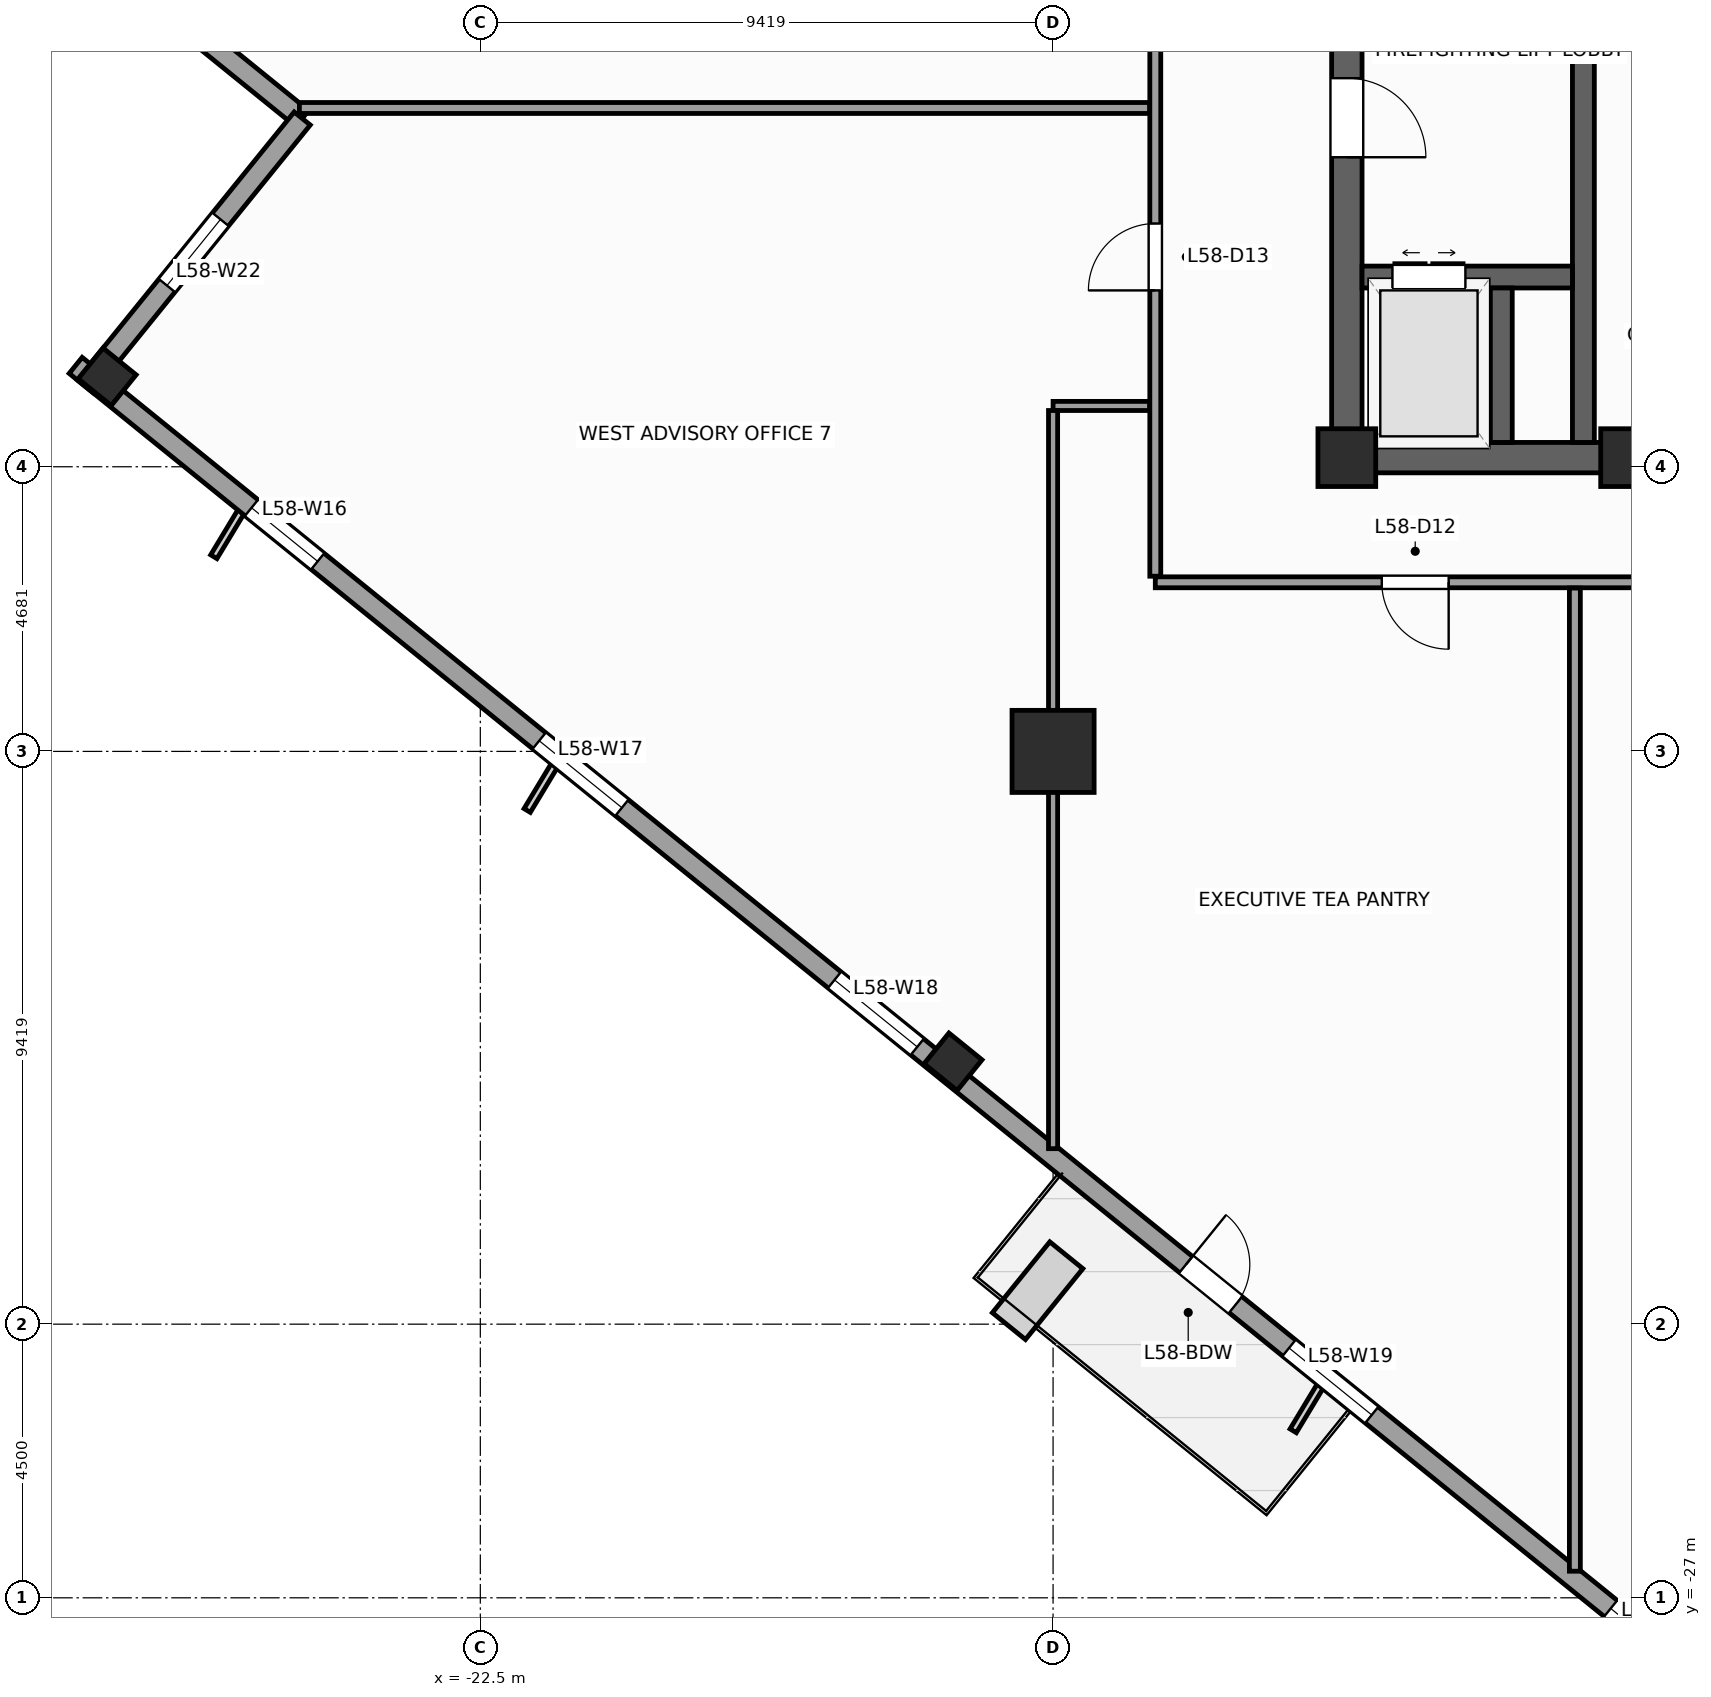
"""IFC4 building model, lengths in metres.
Left out: names, types, materials, properties, quantities, classifications, styles, units other than length and angle.
Written with IfcOpenShell. Run it as: python <this file> out.ifc"""

import sys

from ifc_helpers import new_model, si_unit, direction, frame, frame_2d, origin, origin_2d, place, context, subcontext, project, spatial, rectangle, extrude, source, transform, mapped, element, fill, save


model = new_model("IFC4")
c1 = context("Model", 3, precision=1e-05, world=origin(), true_north=direction((0.0, 1.0)))
c2 = subcontext(c1, "Body", "Model", "MODEL_VIEW")
j1 = project(units=[si_unit("LENGTHUNIT", "METRE"), si_unit("PLANEANGLEUNIT", "RADIAN")], contexts=[c1])
p1 = place(None, origin())
s1 = spatial("IfcSite", under=j1, at=p1, CompositionType="ELEMENT")
p2 = place(p1, origin())
s2 = spatial("IfcBuilding", under=s1, at=p2, CompositionType="ELEMENT")
p3 = place(p2, frame((0.0, 0.0, 240.7)))
s3 = spatial("IfcBuildingStorey", under=s2, at=p3, CompositionType="ELEMENT", Elevation=240.7)
p4 = place(p3, frame((-8.5, -8.25, 0.0), z_axis=(0.0, 0.0, 1.0), x_axis=(1.0, 0.0, 0.0)))
e1 = element("IfcWall", 1, at=p4, inside=s3, PredefinedType="SHEAR", context=c2, shape_type="SweptSolid", body=[
    extrude(rectangle(XDim=17.0, YDim=0.5, at=frame_2d((8.5, 0.0))), origin(), (0.0, 0.0, 1.0), 3.9),
])
p5 = place(p4, frame((7.85, 0.0, 0.0)))
e2 = element("IfcOpeningElement", 2, at=p5, cuts=e1, PredefinedType="OPENING", context=c2, shape_type="SweptSolid", body=[
    extrude(rectangle(XDim=1.3, YDim=2.2, at=frame_2d((0.65, 1.1))), frame((0.0, 0.26, 0.0), z_axis=(0.0, -1.0, 0.0), x_axis=(1.0, 0.0, 0.0)), (0.0, 0.0, 1.0), 0.52),
])
p6 = place(p3, frame((-8.25, -8.0, 0.0), z_axis=(0.0, 0.0, 1.0), x_axis=(0.0, 1.0, 0.0)))
e3 = element("IfcWall", 3, at=p6, inside=s3, PredefinedType="SHEAR", context=c2, shape_type="SweptSolid", body=[
    extrude(rectangle(XDim=16.0, YDim=0.5, at=frame_2d((8.0, 0.0))), origin(), (0.0, 0.0, 1.0), 3.9),
])
p7 = place(p6, frame((4.69, 0.0, 0.0)))
e4 = element("IfcOpeningElement", 4, at=p7, cuts=e3, PredefinedType="OPENING", context=c2, shape_type="SweptSolid", body=[
    extrude(rectangle(XDim=1.3, YDim=2.2, at=frame_2d((0.65, 1.1))), frame((0.0, 0.26, 0.0), z_axis=(0.0, -1.0, 0.0), x_axis=(1.0, 0.0, 0.0)), (0.0, 0.0, 1.0), 0.52),
])
p8 = place(p3, frame((-4.36, -8.0, 0.0), z_axis=(0.0, 0.0, 1.0), x_axis=(0.0, 1.0, 0.0)))
e5 = element("IfcWall", 5, at=p8, inside=s3, PredefinedType="SHEAR", context=c2, shape_type="SweptSolid", body=[
    extrude(rectangle(XDim=16.0, YDim=0.36, at=frame_2d((8.0, 0.0))), origin(), (0.0, 0.0, 1.0), 3.9),
])
p9 = place(p3, frame((-8.0, -5.28, 0.0), z_axis=(0.0, 0.0, 1.0), x_axis=(1.0, 0.0, 0.0)))
e6 = element("IfcWall", 6, at=p9, inside=s3, PredefinedType="SHEAR", context=c2, shape_type="SweptSolid", body=[
    extrude(rectangle(XDim=3.46, YDim=0.36, at=frame_2d((1.73, 0.0))), origin(), (0.0, 0.0, 1.0), 3.9),
])
p10 = place(p9, frame((0.5, 0.0, 0.0)))
e7 = element("IfcOpeningElement", 7, at=p10, cuts=e6, PredefinedType="OPENING", context=c2, shape_type="SweptSolid", body=[
    extrude(rectangle(XDim=1.2, YDim=2.25, at=frame_2d((0.6, 1.125))), frame((0.0, 0.19, 0.0), z_axis=(0.0, -1.0, 0.0), x_axis=(1.0, 0.0, 0.0)), (0.0, 0.0, 1.0), 0.38),
])
p11 = place(p3, frame((-5.71, -8.0, 0.0), z_axis=(0.0, 0.0, 1.0), x_axis=(0.0, 1.0, 0.0)))
e8 = element("IfcWall", 8, at=p11, inside=s3, PredefinedType="SHEAR", context=c2, shape_type="SweptSolid", body=[
    extrude(rectangle(XDim=2.54, YDim=0.36, at=frame_2d((1.27, 0.0))), origin(), (0.0, 0.0, 1.0), 3.9),
])
m1 = source(origin(), c2, "Body", "SweptSolid", [
    extrude(rectangle(XDim=0.95, YDim=0.95, at=origin_2d()), origin(), (0.0, 0.0, 1.0), 3.9),
])
for number, where, z_axis, x_axis in (
    (9, (-8.25, -8.25, 0.0), (0.0, 0.0, 1.0), (1.0, 0.0, 0.0)),
    (10, (-3.6, -8.25, 0.0), (0.0, 0.0, 1.0), (1.0, 0.0, 0.0)),
):
    element("IfcColumn", number, at=place(p3, frame(where, z_axis=z_axis, x_axis=x_axis)), inside=s3, PredefinedType="PILASTER", context=c2, shape_type="MappedRepresentation", body=[
        mapped(m1, transform((0.0, 0.0, 0.0), scale=1.0)),
    ])
m2 = source(origin(), c2, "Body", "SweptSolid", [
    extrude(rectangle(XDim=1.35, YDim=1.35, at=origin_2d()), origin(), (0.0, 0.0, 1.0), 3.9),
])
p12 = place(p3, frame((-13.081, -13.081, 0.0), z_axis=(0.0, 0.0, 1.0), x_axis=(1.0, 0.0, 0.0)))
e11 = element("IfcColumn", 11, at=p12, inside=s3, PredefinedType="COLUMN", context=c2, shape_type="MappedRepresentation", body=[
    mapped(m2, transform((0.0, 0.0, 0.0), scale=1.0)),
])
m3 = source(origin(), c2, "Body", "SweptSolid", [
    extrude(rectangle(XDim=0.65, YDim=0.7, at=origin_2d()), origin(), (0.0, 0.0, 1.0), 3.9),
])
for number, where, z_axis, x_axis in (
    (12, (-28.637, -6.92, 0.0), (0.0, 0.0, 1.0), (0.629, 0.777, 0.0)),
    (13, (-14.726, -18.185, 0.0), (0.0, 0.0, 1.0), (0.629, 0.777, 0.0)),
):
    element("IfcColumn", number, at=place(p3, frame(where, z_axis=z_axis, x_axis=x_axis)), inside=s3, PredefinedType="COLUMN", context=c2, shape_type="MappedRepresentation", body=[
        mapped(m3, transform((0.0, 0.0, 0.0), scale=1.0)),
    ])
p13 = place(p3, frame((-29.703, 0.789, 0.0), z_axis=(0.0, 0.0, 1.0), x_axis=(0.77714355312, -0.629323365087, 0.0)))
e14 = element("IfcWall", 14, at=p13, inside=s3, PredefinedType="STANDARD", context=c2, shape_type="SweptSolid", body=[
    extrude(rectangle(XDim=5.5, YDim=0.34, at=frame_2d((2.75, 0.0))), origin(), (0.0, 0.0, 1.0), 3.66),
])
p14 = place(p3, frame((-25.429, -2.673, 0.0), z_axis=(0.0, 0.0, 1.0), x_axis=(-0.629299794138, -0.777162640055, 0.0)))
e15 = element("IfcWall", 15, at=p14, inside=s3, PredefinedType="STANDARD", context=c2, shape_type="SweptSolid", body=[
    extrude(rectangle(XDim=5.67, YDim=0.34, at=frame_2d((2.835, 0.0))), origin(), (0.0, 0.0, 1.0), 3.66),
])
p15 = place(p14, frame((2.135, 0.0, 0.48)))
e16 = element("IfcOpeningElement", 16, at=p15, cuts=e15, PredefinedType="OPENING", context=c2, shape_type="SweptSolid", body=[
    extrude(rectangle(XDim=1.4, YDim=2.4, at=frame_2d((0.7, 1.2))), frame((0.0, 0.18, 0.0), z_axis=(0.0, -1.0, 0.0), x_axis=(1.0, 0.0, 0.0)), (0.0, 0.0, 1.0), 0.36),
])
p16 = place(p3, frame((-29.154, -6.733, 0.0), z_axis=(0.0, 0.0, 1.0), x_axis=(0.77714192302, -0.629325378072, 0.0)))
e17 = element("IfcWall", 17, at=p16, inside=s3, PredefinedType="STANDARD", context=c2, shape_type="SweptSolid", body=[
    extrude(rectangle(XDim=36.84, YDim=0.34, at=frame_2d((18.42, 0.0))), origin(), (0.0, 0.0, 1.0), 2.96),
])
p17 = place(p16, frame((23.495, 0.0, 0.0)))
e18 = element("IfcOpeningElement", 18, at=p17, cuts=e17, PredefinedType="OPENING", context=c2, shape_type="SweptSolid", body=[
    extrude(rectangle(XDim=1.05, YDim=2.25, at=frame_2d((0.525, 1.125))), frame((0.0, 0.18, 0.0), z_axis=(0.0, -1.0, 0.0), x_axis=(1.0, 0.0, 0.0)), (0.0, 0.0, 1.0), 0.36),
])
p18 = place(p16, frame((3.721, 0.0, 0.48)))
e19 = element("IfcOpeningElement", 19, at=p18, cuts=e17, PredefinedType="OPENING", context=c2, shape_type="SweptSolid", body=[
    extrude(rectangle(XDim=1.4, YDim=2.4, at=frame_2d((0.7, 1.2))), frame((0.0, 0.18, 0.0), z_axis=(0.0, -1.0, 0.0), x_axis=(1.0, 0.0, 0.0)), (0.0, 0.0, 1.0), 0.36),
])
p19 = place(p16, frame((9.809, 0.0, 0.58)))
e20 = element("IfcOpeningElement", 20, at=p19, cuts=e17, PredefinedType="OPENING", context=c2, shape_type="SweptSolid", body=[
    extrude(rectangle(XDim=1.75, YDim=2.3, at=frame_2d((0.875, 1.15))), frame((0.0, 0.18, 0.0), z_axis=(0.0, -1.0, 0.0), x_axis=(1.0, 0.0, 0.0)), (0.0, 0.0, 1.0), 0.36),
])
p20 = place(p16, frame((16.058, 0.0, 0.58)))
e21 = element("IfcOpeningElement", 21, at=p20, cuts=e17, PredefinedType="OPENING", context=c2, shape_type="SweptSolid", body=[
    extrude(rectangle(XDim=1.75, YDim=2.3, at=frame_2d((0.875, 1.15))), frame((0.0, 0.18, 0.0), z_axis=(0.0, -1.0, 0.0), x_axis=(1.0, 0.0, 0.0)), (0.0, 0.0, 1.0), 0.36),
])
p21 = place(p16, frame((25.676, 0.0, 0.58)))
e22 = element("IfcOpeningElement", 22, at=p21, cuts=e17, PredefinedType="OPENING", context=c2, shape_type="SweptSolid", body=[
    extrude(rectangle(XDim=1.75, YDim=2.3, at=frame_2d((0.875, 1.15))), frame((0.0, 0.18, 0.0), z_axis=(0.0, -1.0, 0.0), x_axis=(1.0, 0.0, 0.0)), (0.0, 0.0, 1.0), 0.36),
])
p22 = place(p16, frame((32.482, 0.0, 0.48)))
e23 = element("IfcOpeningElement", 23, at=p22, cuts=e17, PredefinedType="OPENING", context=c2, shape_type="SweptSolid", body=[
    extrude(rectangle(XDim=1.4, YDim=2.4, at=frame_2d((0.7, 1.2))), frame((0.0, 0.18, 0.0), z_axis=(0.0, -1.0, 0.0), x_axis=(1.0, 0.0, 0.0)), (0.0, 0.0, 1.0), 0.36),
])
p23 = place(p3, frame((-11.4, -10.3, 0.0), z_axis=(0.0, 0.0, 1.0), x_axis=(1.0, 0.0, 0.0)))
e24 = element("IfcWall", 24, at=p23, inside=s3, PredefinedType="PARTITIONING", context=c2, shape_type="SweptSolid", body=[
    extrude(rectangle(XDim=21.7, YDim=0.18, at=frame_2d((10.85, 0.0))), origin(), (0.0, 0.0, 1.0), 3.66),
])
p24 = place(p23, frame((12.989, 0.0, 0.0)))
e25 = element("IfcOpeningElement", 25, at=p24, cuts=e24, PredefinedType="OPENING", context=c2, shape_type="SweptSolid", body=[
    extrude(rectangle(XDim=0.95, YDim=2.1, at=frame_2d((0.475, 1.05))), frame((0.0, 0.1, 0.0), z_axis=(0.0, -1.0, 0.0), x_axis=(1.0, 0.0, 0.0)), (0.0, 0.0, 1.0), 0.2),
])
p25 = place(p23, frame((17.585, 0.0, 0.0)))
e26 = element("IfcOpeningElement", 26, at=p25, cuts=e24, PredefinedType="OPENING", context=c2, shape_type="SweptSolid", body=[
    extrude(rectangle(XDim=1.1, YDim=2.2, at=frame_2d((0.55, 1.1))), frame((0.0, 0.1, 0.0), z_axis=(0.0, -1.0, 0.0), x_axis=(1.0, 0.0, 0.0)), (0.0, 0.0, 1.0), 0.2),
])
p26 = place(p23, frame((9.075, 0.0, 0.0)))
e27 = element("IfcOpeningElement", 27, at=p26, cuts=e24, PredefinedType="OPENING", context=c2, shape_type="SweptSolid", body=[
    extrude(rectangle(XDim=1.1, YDim=2.2, at=frame_2d((0.55, 1.1))), frame((0.0, 0.1, 0.0), z_axis=(0.0, -1.0, 0.0), x_axis=(1.0, 0.0, 0.0)), (0.0, 0.0, 1.0), 0.2),
])
p27 = place(p23, frame((3.724, 0.0, 0.0)))
e28 = element("IfcOpeningElement", 28, at=p27, cuts=e24, PredefinedType="OPENING", context=c2, shape_type="SweptSolid", body=[
    extrude(rectangle(XDim=1.1, YDim=2.2, at=frame_2d((0.55, 1.1))), frame((0.0, 0.1, 0.0), z_axis=(0.0, -1.0, 0.0), x_axis=(1.0, 0.0, 0.0)), (0.0, 0.0, 1.0), 0.2),
])
p28 = place(p3, frame((-11.4, -10.2, 0.0), z_axis=(0.0, 0.0, 1.0), x_axis=(0.0, 1.0, 0.0)))
e29 = element("IfcWall", 29, at=p28, inside=s3, PredefinedType="PARTITIONING", context=c2, shape_type="SweptSolid", body=[
    extrude(rectangle(XDim=20.4, YDim=0.18, at=frame_2d((10.2, 0.0))), origin(), (0.0, 0.0, 1.0), 3.66),
])
p29 = place(p28, frame((14.85, 0.0, 0.0)))
e30 = element("IfcOpeningElement", 30, at=p29, cuts=e29, PredefinedType="OPENING", context=c2, shape_type="SweptSolid", body=[
    extrude(rectangle(XDim=1.1, YDim=2.2, at=frame_2d((0.55, 1.1))), frame((0.0, 0.1, 0.0), z_axis=(0.0, -1.0, 0.0), x_axis=(1.0, 0.0, 0.0)), (0.0, 0.0, 1.0), 0.2),
])
p30 = place(p28, frame((4.7, 0.0, 0.0)))
e31 = element("IfcOpeningElement", 31, at=p30, cuts=e29, PredefinedType="OPENING", context=c2, shape_type="SweptSolid", body=[
    extrude(rectangle(XDim=1.1, YDim=2.2, at=frame_2d((0.55, 1.1))), frame((0.0, 0.1, 0.0), z_axis=(0.0, -1.0, 0.0), x_axis=(1.0, 0.0, 0.0)), (0.0, 0.0, 1.0), 0.2),
])
p31 = place(p28, frame((9.9, 0.0, 0.0)))
e32 = element("IfcOpeningElement", 32, at=p31, cuts=e29, PredefinedType="OPENING", context=c2, shape_type="SweptSolid", body=[
    extrude(rectangle(XDim=1.1, YDim=2.2, at=frame_2d((0.55, 1.1))), frame((0.0, 0.1, 0.0), z_axis=(0.0, -1.0, 0.0), x_axis=(1.0, 0.0, 0.0)), (0.0, 0.0, 1.0), 0.2),
])
p32 = place(p3, frame((-4.5, -10.395, 0.0), z_axis=(0.0, 0.0, 1.0), x_axis=(0.0, -1.0, 0.0)))
e33 = element("IfcWall", 33, at=p32, inside=s3, PredefinedType="PARTITIONING", context=c2, shape_type="SweptSolid", body=[
    extrude(rectangle(XDim=16.168, YDim=0.18, at=frame_2d((8.084, 0.0))), origin(), (0.0, 0.0, 1.0), 3.66),
])
p33 = place(p3, frame((-11.495, -2.5, 0.0), z_axis=(0.0, 0.0, 1.0), x_axis=(-1.0, 0.0, 0.0)))
e34 = element("IfcWall", 34, at=p33, inside=s3, PredefinedType="PARTITIONING", context=c2, shape_type="SweptSolid", body=[
    extrude(rectangle(XDim=13.98, YDim=0.18, at=frame_2d((6.99, 0.0))), origin(), (0.0, 0.0, 1.0), 3.66),
])
p34 = place(p3, frame((-11.495, -7.4, 0.0), z_axis=(0.0, 0.0, 1.0), x_axis=(-1.0, 0.0, 0.0)))
e35 = element("IfcWall", 35, at=p34, inside=s3, PredefinedType="PARTITIONING", context=c2, shape_type="SweptSolid", body=[
    extrude(rectangle(XDim=1.586, YDim=0.15, at=frame_2d((0.793, 0.0))), origin(), (0.0, 0.0, 1.0), 3.66),
])
p35 = place(p3, frame((-13.081, -7.475, 0.0), z_axis=(0.0, 0.0, 1.0), x_axis=(0.0, -1.0, 0.0)))
e36 = element("IfcWall", 36, at=p35, inside=s3, PredefinedType="PARTITIONING", context=c2, shape_type="SweptSolid", body=[
    extrude(rectangle(XDim=12.139, YDim=0.15, at=frame_2d((6.069, 0.0))), origin(), (0.0, 0.0, 1.0), 2.76),
])
m4 = source(origin(), c2, "Body", "SweptSolid", [
    extrude(rectangle(XDim=1.05, YDim=2.25, at=frame_2d((0.525, 1.125))), frame((0.0, 0.025, 0.0), z_axis=(0.0, -1.0, 0.0), x_axis=(1.0, 0.0, 0.0)), (0.0, 0.0, 1.0), 0.05),
])
p36 = place(p17, origin())
e37 = element("IfcDoor", 37, at=p36, inside=s3, OperationType="SINGLE_SWING_LEFT", PredefinedType="DOOR", context=c2, shape_type="MappedRepresentation", body=[
    mapped(m4, transform((0.0, 0.0, 0.0), scale=1.0)),
])
fill(e18, e37)
m5 = source(origin(), c2, "Body", "SweptSolid", [
    extrude(rectangle(XDim=1.4, YDim=2.4, at=frame_2d((0.7, 1.2))), frame((0.0, 0.03, 0.0), z_axis=(0.0, -1.0, 0.0), x_axis=(1.0, 0.0, 0.0)), (0.0, 0.0, 1.0), 0.06),
])
p37 = place(p18, origin())
e38 = element("IfcWindow", 38, at=p37, inside=s3, PartitioningType="SINGLE_PANEL", PredefinedType="WINDOW", context=c2, shape_type="MappedRepresentation", body=[
    mapped(m5, transform((0.0, 0.0, 0.0), scale=1.0)),
])
fill(e19, e38)
m6 = source(origin(), c2, "Body", "SweptSolid", [
    extrude(rectangle(XDim=1.75, YDim=2.3, at=frame_2d((0.875, 1.15))), frame((0.0, 0.03, 0.0), z_axis=(0.0, -1.0, 0.0), x_axis=(1.0, 0.0, 0.0)), (0.0, 0.0, 1.0), 0.06),
])
p38 = place(p19, origin())
e39 = element("IfcWindow", 39, at=p38, inside=s3, PartitioningType="SINGLE_PANEL", PredefinedType="WINDOW", context=c2, shape_type="MappedRepresentation", body=[
    mapped(m6, transform((0.0, 0.0, 0.0), scale=1.0)),
])
fill(e20, e39)
p39 = place(p20, origin())
e40 = element("IfcWindow", 40, at=p39, inside=s3, PartitioningType="SINGLE_PANEL", PredefinedType="WINDOW", context=c2, shape_type="MappedRepresentation", body=[
    mapped(m6, transform((0.0, 0.0, 0.0), scale=1.0)),
])
fill(e21, e40)
p40 = place(p21, origin())
e41 = element("IfcWindow", 41, at=p40, inside=s3, PartitioningType="SINGLE_PANEL", PredefinedType="WINDOW", context=c2, shape_type="MappedRepresentation", body=[
    mapped(m6, transform((0.0, 0.0, 0.0), scale=1.0)),
])
fill(e22, e41)
p41 = place(p22, origin())
e42 = element("IfcWindow", 42, at=p41, inside=s3, PartitioningType="SINGLE_PANEL", PredefinedType="WINDOW", context=c2, shape_type="MappedRepresentation", body=[
    mapped(m5, transform((0.0, 0.0, 0.0), scale=1.0)),
])
fill(e23, e42)
p42 = place(p15, origin())
e43 = element("IfcWindow", 43, at=p42, inside=s3, PartitioningType="SINGLE_PANEL", PredefinedType="WINDOW", context=c2, shape_type="MappedRepresentation", body=[
    mapped(m5, transform((0.0, 0.0, 0.0), scale=1.0)),
])
fill(e16, e43)
m7 = source(origin(), c2, "Body", "SweptSolid", [
    extrude(rectangle(XDim=1.3, YDim=2.2, at=frame_2d((0.65, 1.1))), frame((0.0, 0.025, 0.0), z_axis=(0.0, -1.0, 0.0), x_axis=(1.0, 0.0, 0.0)), (0.0, 0.0, 1.0), 0.05),
])
p43 = place(p7, frame((1.3, 0.0, 0.0), z_axis=(0.0, 0.0, 1.0), x_axis=(-1.0, 0.0, 0.0)))
e44 = element("IfcDoor", 44, at=p43, inside=s3, OperationType="SINGLE_SWING_LEFT", PredefinedType="DOOR", context=c2, shape_type="MappedRepresentation", body=[
    mapped(m7, transform((0.0, 0.0, 0.0), scale=1.0)),
])
fill(e4, e44)
m8 = source(origin(), c2, "Body", "SweptSolid", [
    extrude(rectangle(XDim=1.2, YDim=2.25, at=frame_2d((0.6, 1.125))), frame((0.0, 0.025, 0.0), z_axis=(0.0, -1.0, 0.0), x_axis=(1.0, 0.0, 0.0)), (0.0, 0.0, 1.0), 0.05),
])
p44 = place(p10, origin())
e45 = element("IfcDoor", 45, at=p44, inside=s3, OperationType="DOUBLE_DOOR_SLIDING", PredefinedType="DOOR", context=c2, shape_type="MappedRepresentation", body=[
    mapped(m8, transform((0.0, 0.0, 0.0), scale=1.0)),
])
fill(e7, e45)
m9 = source(origin(), c2, "Body", "SweptSolid", [
    extrude(rectangle(XDim=1.1, YDim=2.2, at=frame_2d((0.55, 1.1))), frame((0.0, 0.025, 0.0), z_axis=(0.0, -1.0, 0.0), x_axis=(1.0, 0.0, 0.0)), (0.0, 0.0, 1.0), 0.05),
])
p45 = place(p27, frame((1.1, 0.0, 0.0), z_axis=(0.0, 0.0, 1.0), x_axis=(-1.0, 0.0, 0.0)))
e46 = element("IfcDoor", 46, at=p45, inside=s3, OperationType="SINGLE_SWING_RIGHT", PredefinedType="DOOR", context=c2, shape_type="MappedRepresentation", body=[
    mapped(m9, transform((0.0, 0.0, 0.0), scale=1.0)),
])
fill(e28, e46)
p46 = place(p30, origin())
e47 = element("IfcDoor", 47, at=p46, inside=s3, OperationType="SINGLE_SWING_LEFT", PredefinedType="DOOR", context=c2, shape_type="MappedRepresentation", body=[
    mapped(m9, transform((0.0, 0.0, 0.0), scale=1.0)),
])
fill(e31, e47)
save(model, sys.argv[1])
